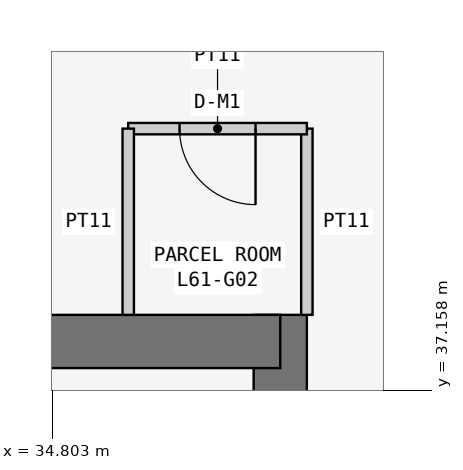
"""IFC4 building model, lengths in metres.
Left out: names, types, materials, properties, quantities, classifications, styles, units other than length and angle.
Written with IfcOpenShell. Run it as: python <this file> out.ifc"""

import sys

from ifc_helpers import new_model, si_unit, direction, frame, frame_2d, origin, place, context, subcontext, project, spatial, rectangle, extrude, element, fill, save


model = new_model("IFC4")
c1 = context("Model", 3, precision=1e-05, world=origin(), true_north=direction((0.0, 1.0)))
c2 = subcontext(c1, "Body", "Model", "MODEL_VIEW")
j1 = project(units=[si_unit("LENGTHUNIT", "METRE"), si_unit("PLANEANGLEUNIT", "RADIAN")], contexts=[c1])
p1 = place(None, origin())
s1 = spatial("IfcSite", under=j1, at=p1, CompositionType="ELEMENT")
p2 = place(p1, origin())
s2 = spatial("IfcBuilding", under=s1, at=p2, CompositionType="ELEMENT")
p3 = place(p2, frame((0.0, 0.0, 233.7)))
s3 = spatial("IfcBuildingStorey", under=s2, at=p3, CompositionType="ELEMENT", Elevation=233.7)
p4 = place(p3, frame((37.8, 21.0, 0.0), z_axis=(0.0, 0.0, 1.0), x_axis=(0.0, 1.0, 0.0)))
e1 = element("IfcWall", 1, at=p4, inside=s3, PredefinedType="SHEAR", context=c2, shape_type="SweptSolid", body=[
    extrude(rectangle(XDim=17.15, YDim=0.7, at=frame_2d((8.575, 0.0))), origin(), (0.0, 0.0, 1.0), 3.6),
])
p5 = place(p4, frame((5.2, 0.0, 0.0)))
e2 = element("IfcOpeningElement", 2, at=p5, cuts=e1, PredefinedType="OPENING", context=c2, shape_type="SweptSolid", body=[
    extrude(rectangle(XDim=1.2, YDim=2.1, at=frame_2d((0.6, 1.05))), frame((0.0, 0.36, 0.0), z_axis=(0.0, -1.0, 0.0), x_axis=(1.0, 0.0, 0.0)), (0.0, 0.0, 1.0), 0.72),
])
p6 = place(p3, frame((37.8, 37.8, 0.0), z_axis=(0.0, 0.0, 1.0), x_axis=(-1.0, 0.0, 0.0)))
e3 = element("IfcWall", 3, at=p6, inside=s3, PredefinedType="SHEAR", context=c2, shape_type="SweptSolid", body=[
    extrude(rectangle(XDim=17.15, YDim=0.7, at=frame_2d((8.575, 0.0))), origin(), (0.0, 0.0, 1.0), 3.6),
])
p7 = place(p3, frame((38.15, 38.15, 0.0), z_axis=(0.0, 0.0, 1.0), x_axis=(0.0, 1.0, 0.0)))
e4 = element("IfcWall", 4, at=p7, inside=s3, PredefinedType="PARTITIONING", context=c2, shape_type="SweptSolid", body=[
    extrude(rectangle(XDim=2.45, YDim=0.15, at=frame_2d((1.225, 0.0))), origin(), (0.0, 0.0, 1.0), 3.45),
])
p8 = place(p3, frame((38.15, 40.6, 0.0), z_axis=(0.0, 0.0, 1.0), x_axis=(-1.0, 0.0, 0.0)))
e5 = element("IfcWall", 5, at=p8, inside=s3, PredefinedType="PARTITIONING", context=c2, shape_type="SweptSolid", body=[
    extrude(rectangle(XDim=2.35, YDim=0.15, at=frame_2d((1.175, 0.0))), origin(), (0.0, 0.0, 1.0), 3.45),
])
p9 = place(p8, frame((0.675, 0.0, 0.0)))
e6 = element("IfcOpeningElement", 6, at=p9, cuts=e5, PredefinedType="OPENING", context=c2, shape_type="SweptSolid", body=[
    extrude(rectangle(XDim=1.0, YDim=2.1, at=frame_2d((0.5, 1.05))), frame((0.0, 0.085, 0.0), z_axis=(0.0, -1.0, 0.0), x_axis=(1.0, 0.0, 0.0)), (0.0, 0.0, 1.0), 0.17),
])
p10 = place(p3, frame((35.8, 40.6, 0.0), z_axis=(0.0, 0.0, 1.0), x_axis=(0.0, -1.0, 0.0)))
e7 = element("IfcWall", 7, at=p10, inside=s3, PredefinedType="PARTITIONING", context=c2, shape_type="SweptSolid", body=[
    extrude(rectangle(XDim=2.45, YDim=0.15, at=frame_2d((1.225, 0.0))), origin(), (0.0, 0.0, 1.0), 3.45),
])
p11 = place(p9, origin())
e8 = element("IfcDoor", 8, at=p11, inside=s3, OperationType="SINGLE_SWING_LEFT", PredefinedType="DOOR", context=c2, shape_type="SweptSolid", body=[
    extrude(rectangle(XDim=1.0, YDim=2.1, at=frame_2d((0.5, 1.05))), frame((0.0, 0.025, 0.0), z_axis=(0.0, -1.0, 0.0), x_axis=(1.0, 0.0, 0.0)), (0.0, 0.0, 1.0), 0.05),
])
fill(e6, e8)
save(model, sys.argv[1])
